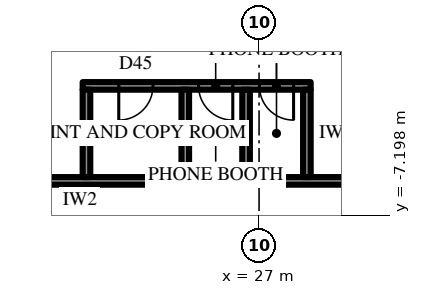
"""IFC4 building model, lengths in metres.
Left out: names, types, materials, properties, quantities, classifications, styles, units other than length and angle.
Written with IfcOpenShell. Run it as: python <this file> out.ifc"""

import sys

from ifc_helpers import new_model, si_unit, direction, frame, frame_2d, origin, place, context, subcontext, project, spatial, rectangle, extrude, element, fill, save


model = new_model("IFC4")
c1 = context("Model", 3, precision=1e-05, world=origin(), true_north=direction((0.0, 1.0)))
c2 = subcontext(c1, "Body", "Model", "MODEL_VIEW")
j1 = project(units=[si_unit("LENGTHUNIT", "METRE"), si_unit("PLANEANGLEUNIT", "RADIAN")], contexts=[c1])
p1 = place(None, origin())
s1 = spatial("IfcSite", under=j1, at=p1, CompositionType="ELEMENT")
p2 = place(p1, origin())
s2 = spatial("IfcBuilding", under=s1, at=p2, CompositionType="ELEMENT")
p3 = place(p2, frame((0.0, 0.0, 199.3)))
s3 = spatial("IfcBuildingStorey", under=s2, at=p3, CompositionType="ELEMENT", Elevation=199.3)
p4 = place(p3, frame((19.644, -28.675, 0.0), z_axis=(0.0, 0.0, 1.0), x_axis=(0.500003084452, 0.866023622968, 0.0)))
e1 = element("IfcWall", 1, at=p4, inside=s3, PredefinedType="SOLIDWALL", context=c2, shape_type="SweptSolid", body=[
    extrude(rectangle(XDim=30.022, YDim=0.3, at=frame_2d((15.011, 0.0))), origin(), (0.0, 0.0, 1.0), 2.2),
])
p5 = place(p4, frame((1.102, 0.0, 0.6)))
e2 = element("IfcOpeningElement", 2, at=p5, cuts=e1, PredefinedType="OPENING", context=c2, shape_type="SweptSolid", body=[
    extrude(rectangle(XDim=2.8, YDim=1.35, at=frame_2d((1.4, 0.675))), frame((0.0, 0.16, 0.0), z_axis=(0.0, -1.0, 0.0), x_axis=(1.0, 0.0, 0.0)), (0.0, 0.0, 1.0), 0.32),
])
p6 = place(p4, frame((6.105, 0.0, 0.6)))
e3 = element("IfcOpeningElement", 3, at=p6, cuts=e1, PredefinedType="OPENING", context=c2, shape_type="SweptSolid", body=[
    extrude(rectangle(XDim=2.8, YDim=1.35, at=frame_2d((1.4, 0.675))), frame((0.0, 0.16, 0.0), z_axis=(0.0, -1.0, 0.0), x_axis=(1.0, 0.0, 0.0)), (0.0, 0.0, 1.0), 0.32),
])
p7 = place(p4, frame((11.909, 0.0, 0.0)))
e4 = element("IfcOpeningElement", 4, at=p7, cuts=e1, PredefinedType="OPENING", context=c2, shape_type="SweptSolid", body=[
    extrude(rectangle(XDim=1.2, YDim=2.1, at=frame_2d((0.6, 1.05))), frame((0.0, 0.16, 0.0), z_axis=(0.0, -1.0, 0.0), x_axis=(1.0, 0.0, 0.0)), (0.0, 0.0, 1.0), 0.32),
])
p8 = place(p4, frame((16.113, 0.0, 0.6)))
e5 = element("IfcOpeningElement", 5, at=p8, cuts=e1, PredefinedType="OPENING", context=c2, shape_type="SweptSolid", body=[
    extrude(rectangle(XDim=2.8, YDim=1.35, at=frame_2d((1.4, 0.675))), frame((0.0, 0.16, 0.0), z_axis=(0.0, -1.0, 0.0), x_axis=(1.0, 0.0, 0.0)), (0.0, 0.0, 1.0), 0.32),
])
p9 = place(p4, frame((21.117, 0.0, 0.6)))
e6 = element("IfcOpeningElement", 6, at=p9, cuts=e1, PredefinedType="OPENING", context=c2, shape_type="SweptSolid", body=[
    extrude(rectangle(XDim=2.8, YDim=1.35, at=frame_2d((1.4, 0.675))), frame((0.0, 0.16, 0.0), z_axis=(0.0, -1.0, 0.0), x_axis=(1.0, 0.0, 0.0)), (0.0, 0.0, 1.0), 0.32),
])
p10 = place(p4, frame((26.12, 0.0, 0.6)))
e7 = element("IfcOpeningElement", 7, at=p10, cuts=e1, PredefinedType="OPENING", context=c2, shape_type="SweptSolid", body=[
    extrude(rectangle(XDim=2.8, YDim=1.35, at=frame_2d((1.4, 0.675))), frame((0.0, 0.16, 0.0), z_axis=(0.0, -1.0, 0.0), x_axis=(1.0, 0.0, 0.0)), (0.0, 0.0, 1.0), 0.32),
])
p11 = place(p3, frame((18.6, -6.3, 0.0), z_axis=(0.0, 0.0, 1.0), x_axis=(1.0, 0.0, 0.0)))
e8 = element("IfcWall", 8, at=p11, inside=s3, PredefinedType="PARTITIONING", context=c2, shape_type="SweptSolid", body=[
    extrude(rectangle(XDim=12.288, YDim=0.2, at=frame_2d((6.144, 0.0))), origin(), (0.0, 0.0, 1.0), 3.9),
])
p12 = place(p11, frame((0.729, 0.0, 0.0)))
e9 = element("IfcOpeningElement", 9, at=p12, cuts=e8, PredefinedType="OPENING", context=c2, shape_type="SweptSolid", body=[
    extrude(rectangle(XDim=1.0, YDim=2.2, at=frame_2d((0.5, 1.1))), frame((0.0, 0.11, 0.0), z_axis=(0.0, -1.0, 0.0), x_axis=(1.0, 0.0, 0.0)), (0.0, 0.0, 1.0), 0.22),
])
p13 = place(p3, frame((22.359, -3.8, 0.0), z_axis=(0.0, 0.0, 1.0), x_axis=(1.0, 0.0, 0.0)))
e10 = element("IfcWall", 10, at=p13, inside=s3, PredefinedType="PARTITIONING", context=c2, shape_type="SweptSolid", body=[
    extrude(rectangle(XDim=6.0, YDim=0.2, at=frame_2d((3.0, 0.0))), origin(), (0.0, 0.0, 1.0), 3.9),
])
p14 = place(p13, frame((0.95, 0.0, 0.0)))
e11 = element("IfcOpeningElement", 11, at=p14, cuts=e10, PredefinedType="OPENING", context=c2, shape_type="SweptSolid", body=[
    extrude(rectangle(XDim=0.9, YDim=2.2, at=frame_2d((0.45, 1.1))), frame((0.0, 0.11, 0.0), z_axis=(0.0, -1.0, 0.0), x_axis=(1.0, 0.0, 0.0)), (0.0, 0.0, 1.0), 0.22),
])
p15 = place(p13, frame((3.05, 0.0, 0.0)))
e12 = element("IfcOpeningElement", 12, at=p15, cuts=e10, PredefinedType="OPENING", context=c2, shape_type="SweptSolid", body=[
    extrude(rectangle(XDim=0.9, YDim=2.2, at=frame_2d((0.45, 1.1))), frame((0.0, 0.11, 0.0), z_axis=(0.0, -1.0, 0.0), x_axis=(1.0, 0.0, 0.0)), (0.0, 0.0, 1.0), 0.22),
])
p16 = place(p13, frame((4.65, 0.0, 0.0)))
e13 = element("IfcOpeningElement", 13, at=p16, cuts=e10, PredefinedType="OPENING", context=c2, shape_type="SweptSolid", body=[
    extrude(rectangle(XDim=0.9, YDim=2.2, at=frame_2d((0.45, 1.1))), frame((0.0, 0.11, 0.0), z_axis=(0.0, -1.0, 0.0), x_axis=(1.0, 0.0, 0.0)), (0.0, 0.0, 1.0), 0.22),
])
for number, where, z_axis, x_axis in (
    (14, (22.458, -6.2, 0.0), (0.0, 0.0, 1.0), (0.0, 1.0, 0.0)),
    (15, (25.059, -6.2, 0.0), (0.0, 0.0, 1.0), (0.0, 1.0, 0.0)),
    (16, (26.658, -6.2, 0.0), (0.0, 0.0, 1.0), (0.0, 1.0, 0.0)),
    (17, (28.259, -6.2, 0.0), (0.0, 0.0, 1.0), (0.0, 1.0, 0.0)),
):
    element("IfcWall", number, at=place(p3, frame(where, z_axis=z_axis, x_axis=x_axis)), inside=s3, PredefinedType="PARTITIONING", context=c2, shape_type="SweptSolid", body=[
        extrude(rectangle(XDim=2.3, YDim=0.2, at=frame_2d((1.15, 0.0))), origin(), (0.0, 0.0, 1.0), 3.9),
    ])
p17 = place(p14, frame((0.9, 0.0, 0.0), z_axis=(0.0, 0.0, 1.0), x_axis=(-1.0, 0.0, 0.0)))
e18 = element("IfcDoor", 18, at=p17, inside=s3, OperationType="SINGLE_SWING_LEFT", PredefinedType="DOOR", context=c2, shape_type="SweptSolid", body=[
    extrude(rectangle(XDim=0.9, YDim=2.2, at=frame_2d((0.45, 1.1))), frame((0.0, 0.025, 0.0), z_axis=(0.0, -1.0, 0.0), x_axis=(1.0, 0.0, 0.0)), (0.0, 0.0, 1.0), 0.05),
])
fill(e11, e18)
p18 = place(p15, frame((0.9, 0.0, 0.0), z_axis=(0.0, 0.0, 1.0), x_axis=(-1.0, 0.0, 0.0)))
e19 = element("IfcDoor", 19, at=p18, inside=s3, OperationType="SINGLE_SWING_RIGHT", PredefinedType="DOOR", context=c2, shape_type="SweptSolid", body=[
    extrude(rectangle(XDim=0.9, YDim=2.2, at=frame_2d((0.45, 1.1))), frame((0.0, 0.025, 0.0), z_axis=(0.0, -1.0, 0.0), x_axis=(1.0, 0.0, 0.0)), (0.0, 0.0, 1.0), 0.05),
])
fill(e12, e19)
p19 = place(p16, frame((0.9, 0.0, 0.0), z_axis=(0.0, 0.0, 1.0), x_axis=(-1.0, 0.0, 0.0)))
e20 = element("IfcDoor", 20, at=p19, inside=s3, OperationType="SINGLE_SWING_RIGHT", PredefinedType="DOOR", context=c2, shape_type="SweptSolid", body=[
    extrude(rectangle(XDim=0.9, YDim=2.2, at=frame_2d((0.45, 1.1))), frame((0.0, 0.025, 0.0), z_axis=(0.0, -1.0, 0.0), x_axis=(1.0, 0.0, 0.0)), (0.0, 0.0, 1.0), 0.05),
])
fill(e13, e20)
save(model, sys.argv[1])
